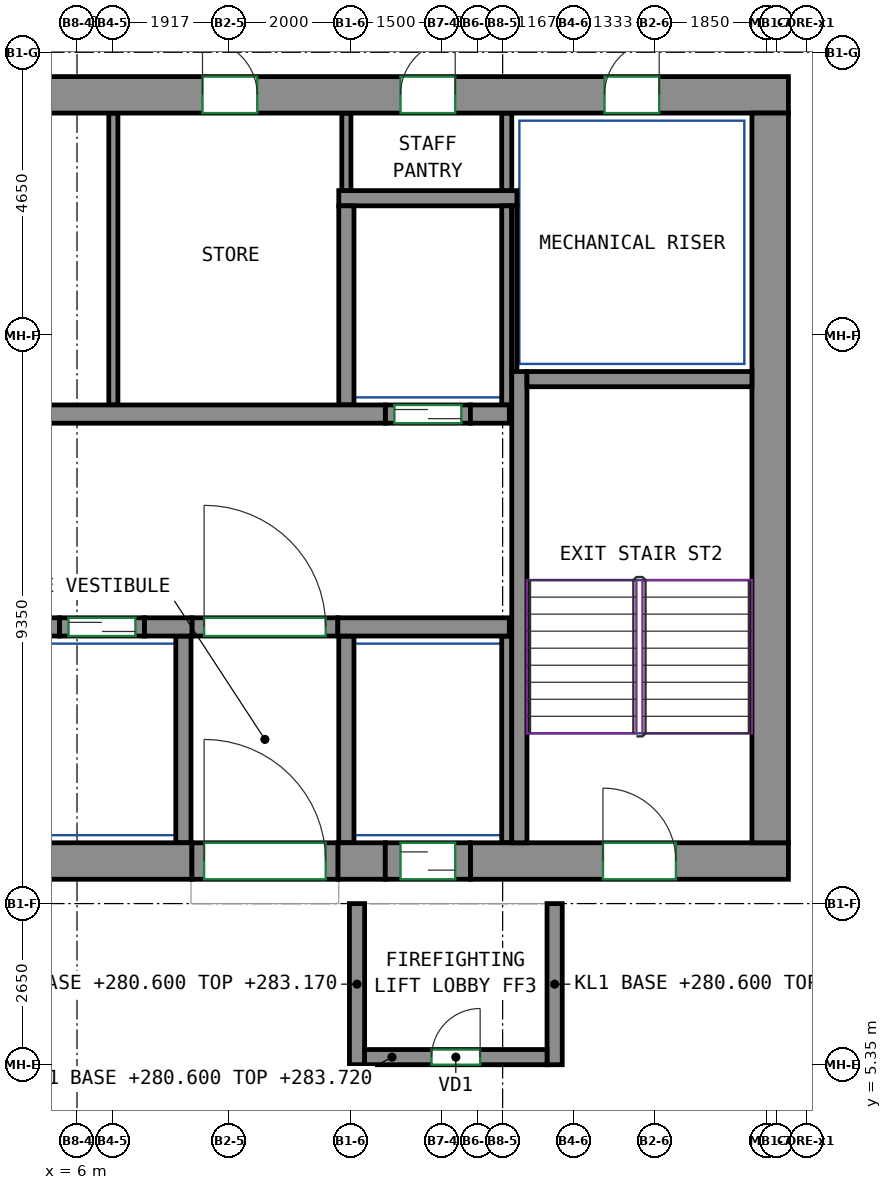
"""IFC4 building model, lengths in metres.
Left out: names, types, materials, properties, quantities, classifications, styles, units other than length and angle.
Written with IfcOpenShell. Run it as: python <this file> out.ifc"""

import sys

from ifc_helpers import new_model, si_unit, direction, frame, frame_2d, origin, place, context, subcontext, project, spatial, rectangle, extrude, source, transform, mapped, element, fill, save


model = new_model("IFC4")
c1 = context("Model", 3, precision=1e-05, world=origin(), true_north=direction((0.0, 1.0)))
c2 = subcontext(c1, "Body", "Model", "MODEL_VIEW")
j1 = project(units=[si_unit("LENGTHUNIT", "METRE"), si_unit("PLANEANGLEUNIT", "RADIAN")], contexts=[c1])
p1 = place(None, origin())
s1 = spatial("IfcSite", under=j1, at=p1, CompositionType="ELEMENT")
p2 = place(p1, origin())
s2 = spatial("IfcBuilding", under=s1, at=p2, CompositionType="ELEMENT")
p3 = place(p2, frame((0.0, 0.0, 280.6)))
s3 = spatial("IfcBuildingStorey", under=s2, at=p3, CompositionType="ELEMENT", Elevation=280.6)
m1 = source(origin(), c2, "Body", "SweptSolid", [
    extrude(rectangle(XDim=14.18, YDim=0.6, at=frame_2d((7.09, 0.0))), origin(), (0.0, 0.0, 1.0), 3.12),
])
p4 = place(p3, frame((-6.29, 8.7, 0.0), z_axis=(0.0, 0.0, 1.0), x_axis=(1.0, 0.0, 0.0)))
e1 = element("IfcWall", 1, at=p4, inside=s3, PredefinedType="SHEAR", context=c2, shape_type="MappedRepresentation", body=[
    mapped(m1, transform((0.0, 0.0, 0.0))),
])
m2 = source(origin(), c2, "Body", "SweptSolid", [
    extrude(rectangle(XDim=0.78, YDim=0.6, at=frame_2d((0.39, 0.0))), origin(), (0.0, 0.0, 1.0), 3.12),
])
p5 = place(p3, frame((10.29, 8.7, 0.0), z_axis=(0.0, 0.0, 1.0), x_axis=(1.0, 0.0, 0.0)))
e2 = element("IfcWall", 2, at=p5, inside=s3, PredefinedType="SHEAR", context=c2, shape_type="MappedRepresentation", body=[
    mapped(m2, transform((0.0, 0.0, 0.0))),
])
m3 = source(origin(), c2, "Body", "SweptSolid", [
    extrude(rectangle(XDim=5.23, YDim=0.6, at=frame_2d((2.615, 0.0))), origin(), (0.0, 0.0, 1.0), 3.12),
])
p6 = place(p3, frame((12.47, 8.7, 0.0), z_axis=(0.0, 0.0, 1.0), x_axis=(1.0, 0.0, 0.0)))
e3 = element("IfcWall", 3, at=p6, inside=s3, PredefinedType="SHEAR", context=c2, shape_type="MappedRepresentation", body=[
    mapped(m3, transform((0.0, 0.0, 0.0))),
])
p7 = place(p6, frame((2.18, 0.0, 0.0)))
e4 = element("IfcOpeningElement", 4, at=p7, cuts=e3, PredefinedType="OPENING", context=c2, shape_type="SweptSolid", body=[
    extrude(rectangle(XDim=1.2, YDim=2.1, at=frame_2d((0.6, 1.05))), frame((0.0, 0.31, 0.0), z_axis=(0.0, -1.0, 0.0), x_axis=(1.0, 0.0, 0.0)), (0.0, 0.0, 1.0), 0.62),
])
m4 = source(origin(), c2, "Body", "SweptSolid", [
    extrude(rectangle(XDim=33.3, YDim=0.6, at=frame_2d((16.65, 0.0))), origin(), (0.0, 0.0, 1.0), 3.12),
])
p8 = place(p3, frame((-15.6, 21.3, 0.0), z_axis=(0.0, 0.0, 1.0), x_axis=(1.0, 0.0, 0.0)))
e5 = element("IfcWall", 5, at=p8, inside=s3, PredefinedType="SHEAR", context=c2, shape_type="MappedRepresentation", body=[
    mapped(m4, transform((0.0, 0.0, 0.0))),
])
p9 = place(p8, frame((8.12, 0.0, 0.0)))
e6 = element("IfcOpeningElement", 6, at=p9, cuts=e5, PredefinedType="OPENING", context=c2, shape_type="SweptSolid", body=[
    extrude(rectangle(XDim=0.9, YDim=2.1, at=frame_2d((0.45, 1.05))), frame((0.0, 0.31, 0.0), z_axis=(0.0, -1.0, 0.0), x_axis=(1.0, 0.0, 0.0)), (0.0, 0.0, 1.0), 0.62),
])
p10 = place(p8, frame((14.15, 0.0, 0.0)))
e7 = element("IfcOpeningElement", 7, at=p10, cuts=e5, PredefinedType="OPENING", context=c2, shape_type="SweptSolid", body=[
    extrude(rectangle(XDim=0.9, YDim=2.1, at=frame_2d((0.45, 1.05))), frame((0.0, 0.31, 0.0), z_axis=(0.0, -1.0, 0.0), x_axis=(1.0, 0.0, 0.0)), (0.0, 0.0, 1.0), 0.62),
])
p11 = place(p8, frame((18.974, 0.0, 0.0)))
e8 = element("IfcOpeningElement", 8, at=p11, cuts=e5, PredefinedType="OPENING", context=c2, shape_type="SweptSolid", body=[
    extrude(rectangle(XDim=0.9, YDim=2.1, at=frame_2d((0.45, 1.05))), frame((0.0, 0.31, 0.0), z_axis=(0.0, -1.0, 0.0), x_axis=(1.0, 0.0, 0.0)), (0.0, 0.0, 1.0), 0.62),
])
p12 = place(p8, frame((23.664, 0.0, 0.0)))
e9 = element("IfcOpeningElement", 9, at=p12, cuts=e5, PredefinedType="OPENING", context=c2, shape_type="SweptSolid", body=[
    extrude(rectangle(XDim=0.9, YDim=2.1, at=frame_2d((0.45, 1.05))), frame((0.0, 0.31, 0.0), z_axis=(0.0, -1.0, 0.0), x_axis=(1.0, 0.0, 0.0)), (0.0, 0.0, 1.0), 0.62),
])
p13 = place(p8, frame((26.92, 0.0, 0.0)))
e10 = element("IfcOpeningElement", 10, at=p13, cuts=e5, PredefinedType="OPENING", context=c2, shape_type="SweptSolid", body=[
    extrude(rectangle(XDim=0.9, YDim=2.1, at=frame_2d((0.45, 1.05))), frame((0.0, 0.31, 0.0), z_axis=(0.0, -1.0, 0.0), x_axis=(1.0, 0.0, 0.0)), (0.0, 0.0, 1.0), 0.62),
])
p14 = place(p8, frame((2.125, 0.0, 0.0)))
e11 = element("IfcOpeningElement", 11, at=p14, cuts=e5, PredefinedType="OPENING", context=c2, shape_type="SweptSolid", body=[
    extrude(rectangle(XDim=0.9, YDim=2.1, at=frame_2d((0.45, 1.05))), frame((0.0, 0.31, 0.0), z_axis=(0.0, -1.0, 0.0), x_axis=(1.0, 0.0, 0.0)), (0.0, 0.0, 1.0), 0.62),
])
p15 = place(p8, frame((30.275, 0.0, 0.0)))
e12 = element("IfcOpeningElement", 12, at=p15, cuts=e5, PredefinedType="OPENING", context=c2, shape_type="SweptSolid", body=[
    extrude(rectangle(XDim=0.9, YDim=2.1, at=frame_2d((0.45, 1.05))), frame((0.0, 0.31, 0.0), z_axis=(0.0, -1.0, 0.0), x_axis=(1.0, 0.0, 0.0)), (0.0, 0.0, 1.0), 0.62),
])
m5 = source(origin(), c2, "Body", "SweptSolid", [
    extrude(rectangle(XDim=12.0, YDim=0.6, at=frame_2d((6.0, 0.0))), origin(), (0.0, 0.0, 1.0), 3.12),
])
p16 = place(p3, frame((17.4, 9.0, 0.0), z_axis=(0.0, 0.0, 1.0), x_axis=(0.0, 1.0, 0.0)))
e13 = element("IfcWall", 13, at=p16, inside=s3, PredefinedType="SHEAR", context=c2, shape_type="MappedRepresentation", body=[
    mapped(m5, transform((0.0, 0.0, 0.0))),
])
m6 = source(origin(), c2, "Body", "SweptSolid", [
    extrude(rectangle(XDim=7.75, YDim=0.25, at=frame_2d((3.875, 0.0))), origin(), (0.0, 0.0, 1.0), 3.12),
])
p17 = place(p3, frame((13.275, 9.0, 0.0), z_axis=(0.0, 0.0, 1.0), x_axis=(0.0, 1.0, 0.0)))
e14 = element("IfcWall", 14, at=p17, inside=s3, PredefinedType="SHEAR", context=c2, shape_type="MappedRepresentation", body=[
    mapped(m6, transform((0.0, 0.0, 0.0))),
])
m7 = source(origin(), c2, "Body", "SweptSolid", [
    extrude(rectangle(XDim=3.7, YDim=0.25, at=frame_2d((1.85, 0.0))), origin(), (0.0, 0.0, 1.0), 3.12),
])
p18 = place(p3, frame((13.4, 16.625, 0.0), z_axis=(0.0, 0.0, 1.0), x_axis=(1.0, 0.0, 0.0)))
e15 = element("IfcWall", 15, at=p18, inside=s3, PredefinedType="SHEAR", context=c2, shape_type="MappedRepresentation", body=[
    mapped(m7, transform((0.0, 0.0, 0.0))),
])
m8 = source(origin(), c2, "Body", "SweptSolid", [
    extrude(rectangle(XDim=1.28, YDim=0.3, at=frame_2d((0.64, 0.0))), origin(), (0.0, 0.0, 1.0), 3.12),
])
p19 = place(p3, frame((4.43, 12.55, 0.0), z_axis=(0.0, 0.0, 1.0), x_axis=(1.0, 0.0, 0.0)))
e16 = element("IfcWall", 16, at=p19, inside=s3, PredefinedType="SHEAR", context=c2, shape_type="MappedRepresentation", body=[
    mapped(m8, transform((0.0, 0.0, 0.0))),
])
m9 = source(origin(), c2, "Body", "SweptSolid", [
    extrude(rectangle(XDim=0.78, YDim=0.3, at=frame_2d((0.39, 0.0))), origin(), (0.0, 0.0, 1.0), 3.12),
])
p20 = place(p3, frame((7.11, 12.55, 0.0), z_axis=(0.0, 0.0, 1.0), x_axis=(1.0, 0.0, 0.0)))
e17 = element("IfcWall", 17, at=p20, inside=s3, PredefinedType="SHEAR", context=c2, shape_type="MappedRepresentation", body=[
    mapped(m9, transform((0.0, 0.0, 0.0))),
])
m10 = source(origin(), c2, "Body", "SweptSolid", [
    extrude(rectangle(XDim=2.82, YDim=0.3, at=frame_2d((1.41, 0.0))), origin(), (0.0, 0.0, 1.0), 3.12),
])
p21 = place(p3, frame((10.29, 12.55, 0.0), z_axis=(0.0, 0.0, 1.0), x_axis=(1.0, 0.0, 0.0)))
e18 = element("IfcWall", 18, at=p21, inside=s3, PredefinedType="SHEAR", context=c2, shape_type="MappedRepresentation", body=[
    mapped(m10, transform((0.0, 0.0, 0.0))),
])
m11 = source(origin(), c2, "Body", "SweptSolid", [
    extrude(rectangle(XDim=22.08, YDim=0.3, at=frame_2d((11.04, 0.0))), origin(), (0.0, 0.0, 1.0), 3.12),
])
p22 = place(p3, frame((-11.01, 16.05, 0.0), z_axis=(0.0, 0.0, 1.0), x_axis=(1.0, 0.0, 0.0)))
e19 = element("IfcWall", 19, at=p22, inside=s3, PredefinedType="SHEAR", context=c2, shape_type="MappedRepresentation", body=[
    mapped(m11, transform((0.0, 0.0, 0.0))),
])
m12 = source(origin(), c2, "Body", "SweptSolid", [
    extrude(rectangle(XDim=0.64, YDim=0.3, at=frame_2d((0.32, 0.0))), origin(), (0.0, 0.0, 1.0), 3.12),
])
p23 = place(p3, frame((12.47, 16.05, 0.0), z_axis=(0.0, 0.0, 1.0), x_axis=(1.0, 0.0, 0.0)))
e20 = element("IfcWall", 20, at=p23, inside=s3, PredefinedType="SHEAR", context=c2, shape_type="MappedRepresentation", body=[
    mapped(m12, transform((0.0, 0.0, 0.0))),
])
m13 = source(origin(), c2, "Body", "SweptSolid", [
    extrude(rectangle(XDim=1.4, YDim=0.3, at=frame_2d((0.7, 0.0))), origin(), (0.0, 0.0, 1.0), 3.12),
])
p24 = place(p3, frame((5.71, 12.55, 0.0), z_axis=(0.0, 0.0, 1.0), x_axis=(1.0, 0.0, 0.0)))
e21 = element("IfcWall", 21, at=p24, inside=s3, PredefinedType="PARTITIONING", context=c2, shape_type="MappedRepresentation", body=[
    mapped(m13, transform((0.0, 0.0, 0.0))),
])
p25 = place(p24, frame((0.15, 0.0, 0.0)))
e22 = element("IfcOpeningElement", 22, at=p25, cuts=e21, PredefinedType="OPENING", context=c2, shape_type="SweptSolid", body=[
    extrude(rectangle(XDim=1.1, YDim=2.1, at=frame_2d((0.55, 1.05))), frame((0.0, 0.16, 0.0), z_axis=(0.0, -1.0, 0.0), x_axis=(1.0, 0.0, 0.0)), (0.0, 0.0, 1.0), 0.32),
])
m14 = source(origin(), c2, "Body", "SweptSolid", [
    extrude(rectangle(XDim=1.4, YDim=0.3, at=frame_2d((0.7, 0.0))), origin(), (0.0, 0.0, 1.0), 3.12),
])
p26 = place(p3, frame((11.07, 16.05, 0.0), z_axis=(0.0, 0.0, 1.0), x_axis=(1.0, 0.0, 0.0)))
e23 = element("IfcWall", 23, at=p26, inside=s3, PredefinedType="PARTITIONING", context=c2, shape_type="MappedRepresentation", body=[
    mapped(m14, transform((0.0, 0.0, 0.0))),
])
p27 = place(p26, frame((0.15, 0.0, 0.0)))
e24 = element("IfcOpeningElement", 24, at=p27, cuts=e23, PredefinedType="OPENING", context=c2, shape_type="SweptSolid", body=[
    extrude(rectangle(XDim=1.1, YDim=2.1, at=frame_2d((0.55, 1.05))), frame((0.0, 0.16, 0.0), z_axis=(0.0, -1.0, 0.0), x_axis=(1.0, 0.0, 0.0)), (0.0, 0.0, 1.0), 0.32),
])
m15 = source(origin(), c2, "Body", "SweptSolid", [
    extrude(rectangle(XDim=2.4, YDim=0.3, at=frame_2d((1.2, 0.0))), origin(), (0.0, 0.0, 1.0), 3.12),
])
p28 = place(p3, frame((7.89, 12.55, 0.0), z_axis=(0.0, 0.0, 1.0), x_axis=(1.0, 0.0, 0.0)))
e25 = element("IfcWall", 25, at=p28, inside=s3, PredefinedType="PARTITIONING", context=c2, shape_type="MappedRepresentation", body=[
    mapped(m15, transform((0.0, 0.0, 0.0))),
])
p29 = place(p28, frame((0.2, 0.0, 0.0)))
e26 = element("IfcOpeningElement", 26, at=p29, cuts=e25, PredefinedType="OPENING", context=c2, shape_type="SweptSolid", body=[
    extrude(rectangle(XDim=2.0, YDim=2.1, at=frame_2d((1.0, 1.05))), frame((0.0, 0.16, 0.0), z_axis=(0.0, -1.0, 0.0), x_axis=(1.0, 0.0, 0.0)), (0.0, 0.0, 1.0), 0.32),
])
m16 = source(origin(), c2, "Body", "SweptSolid", [
    extrude(rectangle(XDim=2.65, YDim=0.25, at=frame_2d((1.325, 0.0))), origin(), (0.0, 0.0, 1.0), 2.57),
])
for number, where, z_axis, x_axis in (
    (27, (10.605, 5.35, 0.0), (0.0, 0.0, 1.0), (0.0, 1.0, 0.0)),
    (28, (13.855, 5.35, 0.0), (0.0, 0.0, 1.0), (0.0, 1.0, 0.0)),
):
    element("IfcWall", number, at=place(p3, frame(where, z_axis=z_axis, x_axis=x_axis)), inside=s3, PredefinedType="PARTITIONING", context=c2, shape_type="MappedRepresentation", body=[
        mapped(m16, transform((0.0, 0.0, 0.0))),
    ])
m17 = source(origin(), c2, "Body", "SweptSolid", [
    extrude(rectangle(XDim=3.0, YDim=0.25, at=frame_2d((1.5, 0.0))), origin(), (0.0, 0.0, 1.0), 3.12),
])
p30 = place(p3, frame((10.73, 5.475, 0.0), z_axis=(0.0, 0.0, 1.0), x_axis=(1.0, 0.0, 0.0)))
e29 = element("IfcWall", 29, at=p30, inside=s3, PredefinedType="PARTITIONING", context=c2, shape_type="MappedRepresentation", body=[
    mapped(m17, transform((0.0, 0.0, 0.0))),
])
p31 = place(p30, frame((1.1, 0.0, 0.0)))
e30 = element("IfcOpeningElement", 30, at=p31, cuts=e29, PredefinedType="OPENING", context=c2, shape_type="SweptSolid", body=[
    extrude(rectangle(XDim=0.8, YDim=2.0, at=frame_2d((0.4, 1.0))), frame((0.0, 0.135, 0.0), z_axis=(0.0, -1.0, 0.0), x_axis=(1.0, 0.0, 0.0)), (0.0, 0.0, 1.0), 0.27),
])
m18 = source(origin(), c2, "Body", "SweptSolid", [
    extrude(rectangle(XDim=2.93, YDim=0.25, at=frame_2d((1.465, 0.0))), origin(), (0.0, 0.0, 1.0), 3.12),
])
p32 = place(p3, frame((10.305, 19.6, 0.0), z_axis=(0.0, 0.0, 1.0), x_axis=(1.0, 0.0, 0.0)))
e31 = element("IfcWall", 31, at=p32, inside=s3, PredefinedType="PARTITIONING", context=c2, shape_type="MappedRepresentation", body=[
    mapped(m18, transform((0.0, 0.0, 0.0))),
])
m19 = source(origin(), c2, "Body", "SweptSolid", [
    extrude(rectangle(XDim=3.275, YDim=0.165, at=frame_2d((1.638, 0.0))), origin(), (0.0, 0.0, 1.0), 3.12),
])
p33 = place(p3, frame((13.067, 16.2, 0.0), z_axis=(0.0, 0.0, 1.0), x_axis=(0.0, 1.0, 0.0)))
e32 = element("IfcWall", 32, at=p33, inside=s3, PredefinedType="PARTITIONING", context=c2, shape_type="MappedRepresentation", body=[
    mapped(m19, transform((0.0, 0.0, 0.0))),
])
m20 = source(origin(), c2, "Body", "SweptSolid", [
    extrude(rectangle(XDim=1.275, YDim=0.165, at=frame_2d((0.637, 0.0))), origin(), (0.0, 0.0, 1.0), 3.12),
])
p34 = place(p3, frame((13.067, 19.725, 0.0), z_axis=(0.0, 0.0, 1.0), x_axis=(0.0, 1.0, 0.0)))
e33 = element("IfcWall", 33, at=p34, inside=s3, PredefinedType="PARTITIONING", context=c2, shape_type="MappedRepresentation", body=[
    mapped(m20, transform((0.0, 0.0, 0.0))),
])
m21 = source(origin(), c2, "Body", "SweptSolid", [
    extrude(rectangle(XDim=3.275, YDim=0.25, at=frame_2d((1.638, 0.0))), origin(), (0.0, 0.0, 1.0), 3.12),
])
p35 = place(p3, frame((10.43, 16.2, 0.0), z_axis=(0.0, 0.0, 1.0), x_axis=(0.0, 1.0, 0.0)))
e34 = element("IfcWall", 34, at=p35, inside=s3, PredefinedType="PARTITIONING", context=c2, shape_type="MappedRepresentation", body=[
    mapped(m21, transform((0.0, 0.0, 0.0))),
])
m22 = source(origin(), c2, "Body", "SweptSolid", [
    extrude(rectangle(XDim=2.725, YDim=0.085, at=frame_2d((1.363, 0.0))), origin(), (0.0, 0.0, 1.0), 3.12),
])
p36 = place(p3, frame((13.192, 16.75, 0.0), z_axis=(0.0, 0.0, 1.0), x_axis=(0.0, 1.0, 0.0)))
e35 = element("IfcWall", 35, at=p36, inside=s3, PredefinedType="PARTITIONING", context=c2, shape_type="MappedRepresentation", body=[
    mapped(m22, transform((0.0, 0.0, 0.0))),
])
m23 = source(origin(), c2, "Body", "SweptSolid", [
    extrude(rectangle(XDim=3.4, YDim=0.25, at=frame_2d((1.7, 0.0))), origin(), (0.0, 0.0, 1.0), 3.12),
])
p37 = place(p3, frame((10.43, 9.0, 0.0), z_axis=(0.0, 0.0, 1.0), x_axis=(0.0, 1.0, 0.0)))
e36 = element("IfcWall", 36, at=p37, inside=s3, PredefinedType="PARTITIONING", context=c2, shape_type="MappedRepresentation", body=[
    mapped(m23, transform((0.0, 0.0, 0.0))),
])
m24 = source(origin(), c2, "Body", "SweptSolid", [
    extrude(rectangle(XDim=3.4, YDim=0.165, at=frame_2d((1.7, 0.0))), origin(), (0.0, 0.0, 1.0), 3.12),
])
p38 = place(p3, frame((13.067, 9.0, 0.0), z_axis=(0.0, 0.0, 1.0), x_axis=(0.0, 1.0, 0.0)))
e37 = element("IfcWall", 37, at=p38, inside=s3, PredefinedType="PARTITIONING", context=c2, shape_type="MappedRepresentation", body=[
    mapped(m24, transform((0.0, 0.0, 0.0))),
])
p39 = place(p3, frame((7.75, 9.0, 0.0), z_axis=(0.0, 0.0, 1.0), x_axis=(0.0, 1.0, 0.0)))
e38 = element("IfcWall", 38, at=p39, inside=s3, PredefinedType="PARTITIONING", context=c2, shape_type="MappedRepresentation", body=[
    mapped(m23, transform((0.0, 0.0, 0.0))),
])
m25 = source(origin(), c2, "Body", "SweptSolid", [
    extrude(rectangle(XDim=4.8, YDim=0.15, at=frame_2d((2.4, 0.0))), origin(), (0.0, 0.0, 1.0), 3.12),
])
p40 = place(p3, frame((6.598, 16.2, 0.0), z_axis=(0.0, 0.0, 1.0), x_axis=(0.0, 1.0, 0.0)))
e39 = element("IfcWall", 39, at=p40, inside=s3, PredefinedType="PARTITIONING", context=c2, shape_type="MappedRepresentation", body=[
    mapped(m25, transform((0.0, 0.0, 0.0))),
])
m26 = source(origin(), c2, "Body", "SweptSolid", [
    extrude(rectangle(XDim=1.275, YDim=0.15, at=frame_2d((0.637, 0.0))), origin(), (0.0, 0.0, 1.0), 3.12),
])
p41 = place(p3, frame((10.43, 19.725, 0.0), z_axis=(0.0, 0.0, 1.0), x_axis=(0.0, 1.0, 0.0)))
e40 = element("IfcWall", 40, at=p41, inside=s3, PredefinedType="PARTITIONING", context=c2, shape_type="MappedRepresentation", body=[
    mapped(m26, transform((0.0, 0.0, 0.0))),
])
m27 = source(origin(), c2, "Body", "SweptSolid", [
    extrude(rectangle(XDim=2.4, YDim=0.6, at=frame_2d((1.2, 0.0))), origin(), (0.0, 0.0, 1.0), 2.7),
])
p42 = place(p3, frame((7.89, 8.7, 0.0), z_axis=(0.0, 0.0, 1.0), x_axis=(1.0, 0.0, 0.0)))
e41 = element("IfcWall", 41, at=p42, inside=s3, PredefinedType="PARTITIONING", context=c2, shape_type="MappedRepresentation", body=[
    mapped(m27, transform((0.0, 0.0, 0.0))),
])
p43 = place(p42, frame((0.2, 0.0, 0.0)))
e42 = element("IfcOpeningElement", 42, at=p43, cuts=e41, PredefinedType="OPENING", context=c2, shape_type="SweptSolid", body=[
    extrude(rectangle(XDim=2.0, YDim=2.1, at=frame_2d((1.0, 1.05))), frame((0.0, 0.31, 0.0), z_axis=(0.0, -1.0, 0.0), x_axis=(1.0, 0.0, 0.0)), (0.0, 0.0, 1.0), 0.62),
])
m28 = source(origin(), c2, "Body", "SweptSolid", [
    extrude(rectangle(XDim=1.4, YDim=0.6, at=frame_2d((0.7, 0.0))), origin(), (0.0, 0.0, 1.0), 2.7),
])
p44 = place(p3, frame((11.07, 8.7, 0.0), z_axis=(0.0, 0.0, 1.0), x_axis=(1.0, 0.0, 0.0)))
e43 = element("IfcWall", 43, at=p44, inside=s3, PredefinedType="PARTITIONING", context=c2, shape_type="MappedRepresentation", body=[
    mapped(m28, transform((0.0, 0.0, 0.0))),
])
p45 = place(p44, frame((0.25, 0.0, 0.0)))
e44 = element("IfcOpeningElement", 44, at=p45, cuts=e43, PredefinedType="OPENING", context=c2, shape_type="SweptSolid", body=[
    extrude(rectangle(XDim=0.9, YDim=2.1, at=frame_2d((0.45, 1.05))), frame((0.0, 0.31, 0.0), z_axis=(0.0, -1.0, 0.0), x_axis=(1.0, 0.0, 0.0)), (0.0, 0.0, 1.0), 0.62),
])
p46 = place(p29, origin())
e45 = element("IfcDoor", 45, at=p46, inside=s3, OperationType="DOUBLE_DOOR_SINGLE_SWING", PredefinedType="DOOR", context=c2, shape_type="SweptSolid", body=[
    extrude(rectangle(XDim=2.0, YDim=2.1, at=frame_2d((1.0, 1.05))), frame((0.0, 0.025, 0.0), z_axis=(0.0, -1.0, 0.0), x_axis=(1.0, 0.0, 0.0)), (0.0, 0.0, 1.0), 0.05),
])
fill(e26, e45)
p47 = place(p43, origin())
e46 = element("IfcDoor", 46, at=p47, inside=s3, OperationType="DOUBLE_DOOR_SINGLE_SWING", PredefinedType="DOOR", context=c2, shape_type="SweptSolid", body=[
    extrude(rectangle(XDim=2.0, YDim=2.1, at=frame_2d((1.0, 1.05))), frame((0.0, 0.205, 0.0), z_axis=(0.0, -1.0, 0.0), x_axis=(1.0, 0.0, 0.0)), (0.0, 0.0, 1.0), 0.05),
])
fill(e42, e46)
p48 = place(p31, origin())
e47 = element("IfcDoor", 47, at=p48, inside=s3, OperationType="SINGLE_SWING_RIGHT", PredefinedType="DOOR", context=c2, shape_type="SweptSolid", body=[
    extrude(rectangle(XDim=0.8, YDim=2.0, at=frame_2d((0.4, 1.0))), frame((0.0, 0.025, 0.0), z_axis=(0.0, -1.0, 0.0), x_axis=(1.0, 0.0, 0.0)), (0.0, 0.0, 1.0), 0.05),
])
fill(e30, e47)
p49 = place(p45, origin())
e48 = element("IfcDoor", 48, at=p49, inside=s3, OperationType="SLIDING_TO_LEFT", PredefinedType="DOOR", context=c2, shape_type="SweptSolid", body=[
    extrude(rectangle(XDim=0.9, YDim=2.1, at=frame_2d((0.45, 1.05))), frame((0.0, 0.205, 0.0), z_axis=(0.0, -1.0, 0.0), x_axis=(1.0, 0.0, 0.0)), (0.0, 0.0, 1.0), 0.05),
])
fill(e44, e48)
p50 = place(p25, origin())
e49 = element("IfcDoor", 49, at=p50, inside=s3, OperationType="DOUBLE_DOOR_SLIDING", PredefinedType="DOOR", context=c2, shape_type="SweptSolid", body=[
    extrude(rectangle(XDim=1.1, YDim=2.1, at=frame_2d((0.55, 1.05))), frame((0.0, 0.025, 0.0), z_axis=(0.0, -1.0, 0.0), x_axis=(1.0, 0.0, 0.0)), (0.0, 0.0, 1.0), 0.05),
])
fill(e22, e49)
p51 = place(p27, origin())
e50 = element("IfcDoor", 50, at=p51, inside=s3, OperationType="DOUBLE_DOOR_SLIDING", PredefinedType="DOOR", context=c2, shape_type="SweptSolid", body=[
    extrude(rectangle(XDim=1.1, YDim=2.1, at=frame_2d((0.55, 1.05))), frame((0.0, 0.025, 0.0), z_axis=(0.0, -1.0, 0.0), x_axis=(1.0, 0.0, 0.0)), (0.0, 0.0, 1.0), 0.05),
])
fill(e24, e50)
p52 = place(p12, origin())
e51 = element("IfcDoor", 51, at=p52, inside=s3, OperationType="SINGLE_SWING_LEFT", PredefinedType="DOOR", context=c2, shape_type="SweptSolid", body=[
    extrude(rectangle(XDim=0.9, YDim=2.1, at=frame_2d((0.45, 1.05))), frame((0.0, -0.155, 0.0), z_axis=(0.0, -1.0, 0.0), x_axis=(1.0, 0.0, 0.0)), (0.0, 0.0, 1.0), 0.05),
])
fill(e9, e51)
p53 = place(p13, origin())
e52 = element("IfcDoor", 52, at=p53, inside=s3, OperationType="SINGLE_SWING_RIGHT", PredefinedType="DOOR", context=c2, shape_type="SweptSolid", body=[
    extrude(rectangle(XDim=0.9, YDim=2.1, at=frame_2d((0.45, 1.05))), frame((0.0, -0.155, 0.0), z_axis=(0.0, -1.0, 0.0), x_axis=(1.0, 0.0, 0.0)), (0.0, 0.0, 1.0), 0.05),
])
fill(e10, e52)
p54 = place(p15, origin())
e53 = element("IfcDoor", 53, at=p54, inside=s3, OperationType="SINGLE_SWING_RIGHT", PredefinedType="DOOR", context=c2, shape_type="SweptSolid", body=[
    extrude(rectangle(XDim=0.9, YDim=2.1, at=frame_2d((0.45, 1.05))), frame((0.0, -0.155, 0.0), z_axis=(0.0, -1.0, 0.0), x_axis=(1.0, 0.0, 0.0)), (0.0, 0.0, 1.0), 0.05),
])
fill(e12, e53)
p55 = place(p7, origin())
e54 = element("IfcDoor", 54, at=p55, inside=s3, OperationType="DOUBLE_DOOR_SINGLE_SWING", PredefinedType="DOOR", context=c2, shape_type="SweptSolid", body=[
    extrude(rectangle(XDim=1.2, YDim=2.1, at=frame_2d((0.6, 1.05))), frame((0.0, 0.205, 0.0), z_axis=(0.0, -1.0, 0.0), x_axis=(1.0, 0.0, 0.0)), (0.0, 0.0, 1.0), 0.05),
])
fill(e4, e54)
save(model, sys.argv[1])
